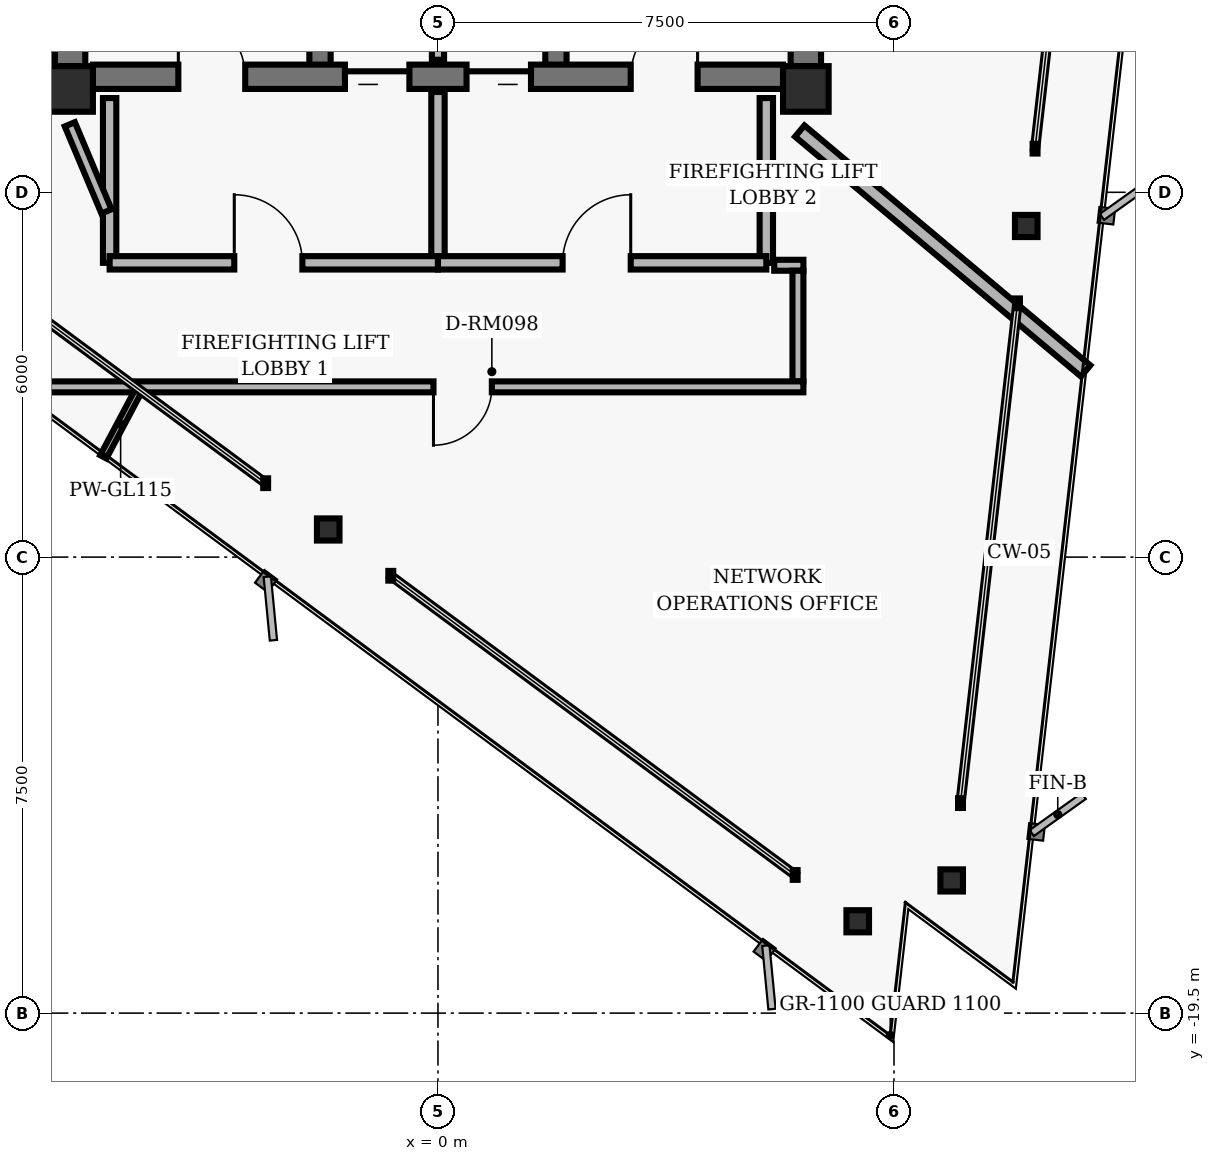
"""IFC4 building model, lengths in metres.
Left out: names, types, materials, properties, quantities, classifications, styles, units other than length and angle.
Written with IfcOpenShell. Run it as: python <this file> out.ifc"""

import sys

from ifc_helpers import new_model, si_unit, direction, frame, frame_2d, origin, origin_2d, place, context, subcontext, project, spatial, rectangle, hollow_rectangle, i_section, extrude, element, fill, save


model = new_model("IFC4")
c1 = context("Model", 3, precision=1e-05, world=origin(), true_north=direction((0.0, 1.0)))
c2 = subcontext(c1, "Body", "Model", "MODEL_VIEW")
j1 = project(units=[si_unit("LENGTHUNIT", "METRE"), si_unit("PLANEANGLEUNIT", "RADIAN")], contexts=[c1])
p1 = place(None, origin())
s1 = spatial("IfcSite", under=j1, at=p1, CompositionType="ELEMENT")
p2 = place(p1, origin())
s2 = spatial("IfcBuilding", under=s1, at=p2, CompositionType="ELEMENT")
p3 = place(p2, frame((0.0, 0.0, 233.12)))
s3 = spatial("IfcBuildingStorey", under=s2, at=p3, CompositionType="ELEMENT", Elevation=233.12)
for number, where, z_axis, x_axis in (
    (1, (-6.05, -4.3, 0.0), (0.0, 0.0, 1.0), (1.0, 0.0, 0.0)),
    (2, (6.05, -4.3, 0.0), (0.0, 0.0, 1.0), (1.0, 0.0, 0.0)),
):
    element("IfcColumn", number, at=place(p3, frame(where, z_axis=z_axis, x_axis=x_axis)), inside=s3, PredefinedType="COLUMN", context=c2, shape_type="SweptSolid", body=[
        extrude(hollow_rectangle(XDim=0.75, YDim=0.75, WallThickness=0.05, InnerFilletRadius=0.02, OuterFilletRadius=0.04, at=origin_2d()), origin(), (0.0, 0.0, 1.0), 3.04),
    ])
for number, where, z_axis, x_axis in (
    (3, (-6.05, -3.925, 0.0), (0.0, 0.0, 1.0), (0.0, 1.0, 0.0)),
    (4, (6.05, -3.925, 0.0), (0.0, 0.0, 1.0), (0.0, 1.0, 0.0)),
):
    element("IfcWall", number, at=place(p3, frame(where, z_axis=z_axis, x_axis=x_axis)), inside=s3, PredefinedType="SHEAR", context=c2, shape_type="SweptSolid", body=[
        extrude(rectangle(XDim=3.55, YDim=0.5, at=frame_2d((1.775, 0.0))), origin(), (0.0, 0.0, 1.0), 2.798),
    ])
for number, where, z_axis, x_axis in (
    (5, (-1.94, -4.1, 0.0), (0.0, 0.0, 1.0), (0.0, 1.0, 0.0)),
    (6, (1.94, -4.1, 0.0), (0.0, 0.0, 1.0), (0.0, 1.0, 0.0)),
):
    element("IfcWall", number, at=place(p3, frame(where, z_axis=z_axis, x_axis=x_axis)), inside=s3, PredefinedType="SHEAR", context=c2, shape_type="SweptSolid", body=[
        extrude(rectangle(XDim=8.2, YDim=0.35, at=frame_2d((4.1, 0.0))), origin(), (0.0, 0.0, 1.0), 2.798),
    ])
p4 = place(p3, frame((-5.675, -4.1, 0.0), z_axis=(0.0, 0.0, 1.0), x_axis=(1.0, 0.0, 0.0)))
e7 = element("IfcWall", 7, at=p4, inside=s3, PredefinedType="SHEAR", context=c2, shape_type="SweptSolid", body=[
    extrude(rectangle(XDim=11.35, YDim=0.4, at=frame_2d((5.675, 0.0))), origin(), (0.0, 0.0, 1.0), 2.798),
])
p5 = place(p4, frame((1.405, 0.0, 0.0)))
e8 = element("IfcOpeningElement", 8, at=p5, cuts=e7, PredefinedType="OPENING", context=c2, shape_type="SweptSolid", body=[
    extrude(rectangle(XDim=1.1, YDim=2.04, at=frame_2d((0.55, 1.02))), frame((0.0, 0.21, 0.0), z_axis=(0.0, -1.0, 0.0), x_axis=(1.0, 0.0, 0.0)), (0.0, 0.0, 1.0), 0.42),
])
p6 = place(p4, frame((8.845, 0.0, 0.0)))
e9 = element("IfcOpeningElement", 9, at=p6, cuts=e7, PredefinedType="OPENING", context=c2, shape_type="SweptSolid", body=[
    extrude(rectangle(XDim=1.1, YDim=2.04, at=frame_2d((0.55, 1.02))), frame((0.0, 0.21, 0.0), z_axis=(0.0, -1.0, 0.0), x_axis=(1.0, 0.0, 0.0)), (0.0, 0.0, 1.0), 0.42),
])
p7 = place(p4, frame((4.145, 0.0, 0.0)))
e10 = element("IfcOpeningElement", 10, at=p7, cuts=e7, PredefinedType="OPENING", context=c2, shape_type="SweptSolid", body=[
    extrude(rectangle(XDim=1.06, YDim=2.04, at=frame_2d((0.53, 1.02))), frame((0.0, 0.21, 0.0), z_axis=(0.0, -1.0, 0.0), x_axis=(1.0, 0.0, 0.0)), (0.0, 0.0, 1.0), 0.42),
])
p8 = place(p4, frame((6.145, 0.0, 0.0)))
e11 = element("IfcOpeningElement", 11, at=p8, cuts=e7, PredefinedType="OPENING", context=c2, shape_type="SweptSolid", body=[
    extrude(rectangle(XDim=1.06, YDim=2.04, at=frame_2d((0.53, 1.02))), frame((0.0, 0.21, 0.0), z_axis=(0.0, -1.0, 0.0), x_axis=(1.0, 0.0, 0.0)), (0.0, 0.0, 1.0), 0.42),
])
for number, where, z_axis, x_axis in (
    (12, (8.448, -17.318, 0.0), (0.0, 0.0, 1.0), (1.0, 0.0, 0.0)),
    (13, (9.675, -6.554, 0.0), (0.0, 0.0, 1.0), (1.0, 0.0, 0.0)),
    (14, (-1.805, -11.546, 0.0), (0.0, 0.0, 1.0), (1.0, 0.0, 0.0)),
    (15, (6.903, -17.99, 0.0), (0.0, 0.0, 1.0), (1.0, 0.0, 0.0)),
):
    element("IfcColumn", number, at=place(p3, frame(where, z_axis=z_axis, x_axis=x_axis)), inside=s3, PredefinedType="COLUMN", context=c2, shape_type="SweptSolid", body=[
        extrude(i_section(OverallWidth=0.371, OverallDepth=0.364, WebThickness=0.013, FlangeThickness=0.022, FilletRadius=0.015, at=origin_2d()), origin(), (0.0, 0.0, 1.0), 3.04),
    ])
p9 = place(p3, frame((0.0, -3.82, 0.0), z_axis=(0.0, 0.0, 1.0), x_axis=(0.0, 1.0, 0.0)))
e16 = element("IfcWall", 16, at=p9, inside=s3, PredefinedType="PARTITIONING", context=c2, shape_type="SweptSolid", body=[
    extrude(rectangle(XDim=2.67, YDim=0.2, at=frame_2d((1.335, 0.0))), origin(), (0.0, 0.0, 1.0), 2.773),
])
for number, where, z_axis, x_axis in (
    (17, (-5.4, -7.16, 0.0), (0.0, 0.0, 1.0), (0.0, 1.0, 0.0)),
    (18, (5.4, -7.16, 0.0), (0.0, 0.0, 1.0), (0.0, 1.0, 0.0)),
):
    element("IfcWall", number, at=place(p3, frame(where, z_axis=z_axis, x_axis=x_axis)), inside=s3, PredefinedType="PARTITIONING", context=c2, shape_type="SweptSolid", body=[
        extrude(rectangle(XDim=2.71, YDim=0.22, at=frame_2d((1.355, 0.0))), origin(), (0.0, 0.0, 1.0), 2.773),
    ])
p10 = place(p3, frame((0.0, -7.16, 0.0), z_axis=(0.0, 0.0, 1.0), x_axis=(0.0, 1.0, 0.0)))
e19 = element("IfcWall", 19, at=p10, inside=s3, PredefinedType="PARTITIONING", context=c2, shape_type="SweptSolid", body=[
    extrude(rectangle(XDim=2.81, YDim=0.22, at=frame_2d((1.405, 0.0))), origin(), (0.0, 0.0, 1.0), 2.773),
])
p11 = place(p3, frame((-5.4, -7.16, 0.0), z_axis=(0.0, 0.0, 1.0), x_axis=(1.0, 0.0, 0.0)))
e20 = element("IfcWall", 20, at=p11, inside=s3, PredefinedType="PARTITIONING", context=c2, shape_type="SweptSolid", body=[
    extrude(rectangle(XDim=5.4, YDim=0.22, at=frame_2d((2.7, 0.0))), origin(), (0.0, 0.0, 1.0), 2.395),
])
p12 = place(p11, frame((2.05, 0.0, 0.0)))
e21 = element("IfcOpeningElement", 21, at=p12, cuts=e20, PredefinedType="OPENING", context=c2, shape_type="SweptSolid", body=[
    extrude(rectangle(XDim=1.12, YDim=2.02, at=frame_2d((0.56, 1.01))), frame((0.0, 0.12, 0.0), z_axis=(0.0, -1.0, 0.0), x_axis=(1.0, 0.0, 0.0)), (0.0, 0.0, 1.0), 0.24),
])
p13 = place(p3, frame((0.0, -7.16, 0.0), z_axis=(0.0, 0.0, 1.0), x_axis=(1.0, 0.0, 0.0)))
e22 = element("IfcWall", 22, at=p13, inside=s3, PredefinedType="PARTITIONING", context=c2, shape_type="SweptSolid", body=[
    extrude(rectangle(XDim=5.4, YDim=0.22, at=frame_2d((2.7, 0.0))), origin(), (0.0, 0.0, 1.0), 2.773),
])
p14 = place(p13, frame((2.05, 0.0, 0.0)))
e23 = element("IfcOpeningElement", 23, at=p14, cuts=e22, PredefinedType="OPENING", context=c2, shape_type="SweptSolid", body=[
    extrude(rectangle(XDim=1.12, YDim=2.02, at=frame_2d((0.56, 1.01))), frame((0.0, 0.12, 0.0), z_axis=(0.0, -1.0, 0.0), x_axis=(1.0, 0.0, 0.0)), (0.0, 0.0, 1.0), 0.24),
])
p15 = place(p3, frame((-6.055, -4.882, 0.0), z_axis=(0.0, 0.0, 1.0), x_axis=(0.387579540458, -0.921836265189, 0.0)))
e24 = element("IfcWall", 24, at=p15, inside=s3, PredefinedType="PARTITIONING", context=c2, shape_type="SweptSolid", body=[
    extrude(rectangle(XDim=1.555, YDim=0.18, at=frame_2d((0.777, 0.0))), origin(), (0.0, 0.0, 1.0), 2.253),
])
p16 = place(p3, frame((5.53, -7.2, 0.0), z_axis=(0.0, 0.0, 1.0), x_axis=(1.0, 0.0, 0.0)))
e25 = element("IfcWall", 25, at=p16, inside=s3, PredefinedType="PARTITIONING", context=c2, shape_type="SweptSolid", body=[
    extrude(rectangle(XDim=0.48, YDim=0.18, at=frame_2d((0.24, 0.0))), origin(), (0.0, 0.0, 1.0), 2.773),
])
p17 = place(p3, frame((5.92, -7.29, 0.0), z_axis=(0.0, 0.0, 1.0), x_axis=(0.0, -1.0, 0.0)))
e26 = element("IfcWall", 26, at=p17, inside=s3, PredefinedType="PARTITIONING", context=c2, shape_type="SweptSolid", body=[
    extrude(rectangle(XDim=1.82, YDim=0.18, at=frame_2d((0.91, 0.0))), origin(), (0.0, 0.0, 1.0), 2.253),
])
p18 = place(p3, frame((6.01, -9.2, 0.0), z_axis=(0.0, 0.0, 1.0), x_axis=(-1.0, 0.0, 0.0)))
e27 = element("IfcWall", 27, at=p18, inside=s3, PredefinedType="PARTITIONING", context=c2, shape_type="SweptSolid", body=[
    extrude(rectangle(XDim=12.84, YDim=0.18, at=frame_2d((6.42, 0.0))), origin(), (0.0, 0.0, 1.0), 2.773),
])
p19 = place(p18, frame((5.124, 0.0, 0.0)))
e28 = element("IfcOpeningElement", 28, at=p19, cuts=e27, PredefinedType="OPENING", context=c2, shape_type="SweptSolid", body=[
    extrude(rectangle(XDim=0.96, YDim=2.02, at=frame_2d((0.48, 1.01))), frame((0.0, 0.1, 0.0), z_axis=(0.0, -1.0, 0.0), x_axis=(1.0, 0.0, 0.0)), (0.0, 0.0, 1.0), 0.2),
])
p20 = place(p3, frame((-4.934, -9.28, 0.0), z_axis=(0.0, 0.0, 1.0), x_axis=(-0.469449445938, -0.88295935224, 0.0)))
e29 = element("IfcWall", 29, at=p20, inside=s3, PredefinedType="MOVABLE", context=c2, shape_type="SweptSolid", body=[
    extrude(rectangle(XDim=1.213, YDim=0.115, at=frame_2d((0.607, 0.0))), origin(), (0.0, 0.0, 1.0), 2.773),
])
p21 = place(p3, frame((5.95, -4.993, 0.0), z_axis=(0.0, 0.0, 1.0), x_axis=(0.766055051894, -0.642774966428, 0.0)))
e30 = element("IfcWall", 30, at=p21, inside=s3, PredefinedType="PARTITIONING", context=c2, shape_type="SweptSolid", body=[
    extrude(rectangle(XDim=6.137, YDim=0.24, at=frame_2d((3.069, 0.0))), origin(), (0.0, 0.0, 1.0), 2.773),
])
p22 = place(p5, origin())
e31 = element("IfcDoor", 31, at=p22, inside=s3, OperationType="SINGLE_SWING_LEFT", PredefinedType="DOOR", context=c2, shape_type="SweptSolid", body=[
    extrude(rectangle(XDim=1.1, YDim=2.04, at=frame_2d((0.55, 1.02))), frame((0.0, 0.025, 0.0), z_axis=(0.0, -1.0, 0.0), x_axis=(1.0, 0.0, 0.0)), (0.0, 0.0, 1.0), 0.05),
])
fill(e8, e31)
p23 = place(p6, origin())
e32 = element("IfcDoor", 32, at=p23, inside=s3, OperationType="SINGLE_SWING_RIGHT", PredefinedType="DOOR", context=c2, shape_type="SweptSolid", body=[
    extrude(rectangle(XDim=1.1, YDim=2.04, at=frame_2d((0.55, 1.02))), frame((0.0, 0.025, 0.0), z_axis=(0.0, -1.0, 0.0), x_axis=(1.0, 0.0, 0.0)), (0.0, 0.0, 1.0), 0.05),
])
fill(e9, e32)
p24 = place(p7, origin())
e33 = element("IfcDoor", 33, at=p24, inside=s3, OperationType="SLIDING_TO_LEFT", PredefinedType="DOOR", context=c2, shape_type="SweptSolid", body=[
    extrude(rectangle(XDim=1.06, YDim=2.04, at=frame_2d((0.53, 1.02))), frame((0.0, 0.025, 0.0), z_axis=(0.0, -1.0, 0.0), x_axis=(1.0, 0.0, 0.0)), (0.0, 0.0, 1.0), 0.05),
])
fill(e10, e33)
p25 = place(p8, origin())
e34 = element("IfcDoor", 34, at=p25, inside=s3, OperationType="SLIDING_TO_RIGHT", PredefinedType="DOOR", context=c2, shape_type="SweptSolid", body=[
    extrude(rectangle(XDim=1.06, YDim=2.04, at=frame_2d((0.53, 1.02))), frame((0.0, 0.025, 0.0), z_axis=(0.0, -1.0, 0.0), x_axis=(1.0, 0.0, 0.0)), (0.0, 0.0, 1.0), 0.05),
])
fill(e11, e34)
p26 = place(p12, origin())
e35 = element("IfcDoor", 35, at=p26, inside=s3, OperationType="SINGLE_SWING_LEFT", PredefinedType="DOOR", context=c2, shape_type="SweptSolid", body=[
    extrude(rectangle(XDim=1.12, YDim=2.02, at=frame_2d((0.56, 1.01))), frame((0.0, 0.025, 0.0), z_axis=(0.0, -1.0, 0.0), x_axis=(1.0, 0.0, 0.0)), (0.0, 0.0, 1.0), 0.05),
])
fill(e21, e35)
p27 = place(p14, origin())
e36 = element("IfcDoor", 36, at=p27, inside=s3, OperationType="SINGLE_SWING_RIGHT", PredefinedType="DOOR", context=c2, shape_type="SweptSolid", body=[
    extrude(rectangle(XDim=1.12, YDim=2.02, at=frame_2d((0.56, 1.01))), frame((0.0, 0.025, 0.0), z_axis=(0.0, -1.0, 0.0), x_axis=(1.0, 0.0, 0.0)), (0.0, 0.0, 1.0), 0.05),
])
fill(e23, e36)
p28 = place(p19, origin())
e37 = element("IfcDoor", 37, at=p28, inside=s3, OperationType="SINGLE_SWING_RIGHT", PredefinedType="DOOR", context=c2, shape_type="SweptSolid", body=[
    extrude(rectangle(XDim=0.96, YDim=2.02, at=frame_2d((0.48, 1.01))), frame((0.0, 0.025, 0.0), z_axis=(0.0, -1.0, 0.0), x_axis=(1.0, 0.0, 0.0)), (0.0, 0.0, 1.0), 0.05),
])
fill(e28, e37)
save(model, sys.argv[1])
